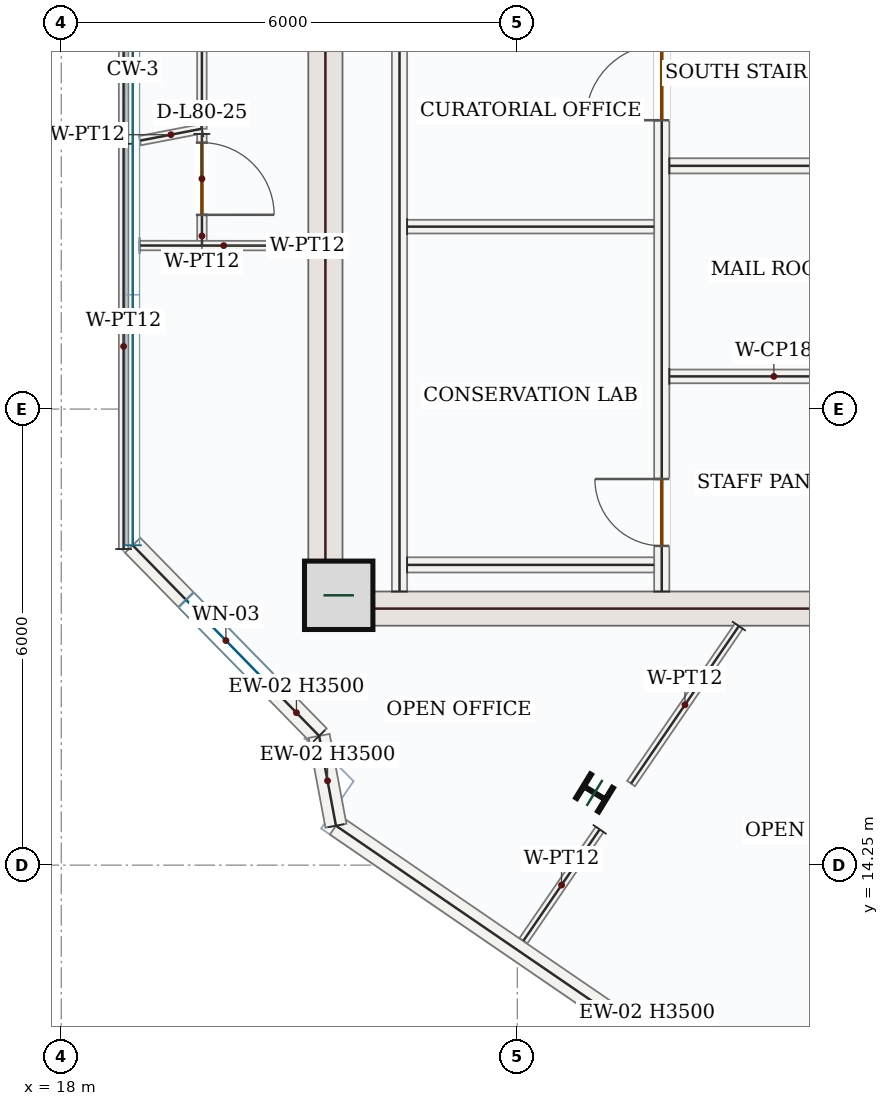
"""IFC4 building model, lengths in metres.
Left out: names, types, materials, properties, quantities, classifications, styles, units other than length and angle.
Written with IfcOpenShell. Run it as: python <this file> out.ifc"""

import sys

from ifc_helpers import new_model, si_unit, direction, frame, frame_2d, origin, origin_2d, place, context, subcontext, project, spatial, rectangle, i_section, extrude, source, transform, mapped, element, fill, save


model = new_model("IFC4")
c1 = context("Model", 3, precision=1e-05, world=origin(), true_north=direction((0.0, 1.0)))
c2 = subcontext(c1, "Body", "Model", "MODEL_VIEW")
j1 = project(units=[si_unit("LENGTHUNIT", "METRE"), si_unit("PLANEANGLEUNIT", "RADIAN")], contexts=[c1])
p1 = place(None, origin())
s1 = spatial("IfcSite", under=j1, at=p1, CompositionType="ELEMENT")
p2 = place(p1, origin())
s2 = spatial("IfcBuilding", under=s1, at=p2, CompositionType="ELEMENT")
p3 = place(p2, frame((0.0, 0.0, 331.05)))
s3 = spatial("IfcBuildingStorey", under=s2, at=p3, CompositionType="ELEMENT", Elevation=331.05)
m1 = source(origin(), c2, "Body", "SweptSolid", [
    extrude(rectangle(XDim=8.55, YDim=0.45, at=frame_2d((4.275, 0.0))), origin(), (0.0, 0.0, 1.0), 3.5),
])
p4 = place(p3, frame((21.475, 17.4, 0.0), z_axis=(0.0, 0.0, 1.0), x_axis=(0.0, 1.0, 0.0)))
e1 = element("IfcWall", 1, at=p4, inside=s3, PredefinedType="SHEAR", context=c2, shape_type="MappedRepresentation", body=[
    mapped(m1, transform((0.0, 0.0, 0.0), x_axis=(1.0, 0.0, 0.0), y_axis=(0.0, 1.0, 0.0), z_axis=(0.0, 0.0, 1.0), scale=1.0)),
])
m2 = source(origin(), c2, "Body", "SweptSolid", [
    extrude(rectangle(XDim=7.1, YDim=0.45, at=frame_2d((3.55, 0.0))), origin(), (0.0, 0.0, 1.0), 3.5),
])
p5 = place(p3, frame((21.7, 17.625, 0.0), z_axis=(0.0, 0.0, 1.0), x_axis=(1.0, 0.0, 0.0)))
e2 = element("IfcWall", 2, at=p5, inside=s3, PredefinedType="SHEAR", context=c2, shape_type="MappedRepresentation", body=[
    mapped(m2, transform((0.0, 0.0, 0.0), x_axis=(1.0, 0.0, 0.0), y_axis=(0.0, 1.0, 0.0), z_axis=(0.0, 0.0, 1.0), scale=1.0)),
])
m3 = source(origin(), c2, "Body", "SweptSolid", [
    extrude(rectangle(XDim=0.9, YDim=0.9, at=origin_2d()), origin(), (0.0, 0.0, 1.0), 3.75),
])
p6 = place(p3, frame((21.65, 17.8, 0.0), z_axis=(0.0, 0.0, 1.0), x_axis=(1.0, 0.0, 0.0)))
e3 = element("IfcColumn", 3, at=p6, inside=s3, PredefinedType="COLUMN", context=c2, shape_type="MappedRepresentation", body=[
    mapped(m3, transform((0.0, 0.0, 0.0), x_axis=(1.0, 0.0, 0.0), y_axis=(0.0, 1.0, 0.0), z_axis=(0.0, 0.0, 1.0), scale=1.0)),
])
m4 = source(origin(), c2, "Body", "SweptSolid", [
    extrude(i_section(OverallWidth=0.369, OverallDepth=0.356, WebThickness=0.011, FlangeThickness=0.018, FilletRadius=0.018, at=origin_2d()), origin(), (0.0, 0.0, 1.0), 3.75),
])
p7 = place(p3, frame((25.016, 15.2, 0.0), z_axis=(0.0, 0.0, 1.0), x_axis=(0.522498564716, 0.852640164354, 0.0)))
e4 = element("IfcColumn", 4, at=p7, inside=s3, PredefinedType="COLUMN", context=c2, shape_type="MappedRepresentation", body=[
    mapped(m4, transform((0.0, 0.0, 0.0), x_axis=(1.0, 0.0, 0.0), y_axis=(0.0, 1.0, 0.0), z_axis=(0.0, 0.0, 1.0), scale=1.0)),
])
p8 = place(p3, frame((21.393, 15.95, 0.0), z_axis=(0.0, 0.0, 1.0), x_axis=(-0.699198279454, 0.714927804753, 0.0)))
e5 = element("IfcWall", 5, at=p8, inside=s3, PredefinedType="SOLIDWALL", context=c2, shape_type="SweptSolid", body=[
    extrude(rectangle(XDim=3.508, YDim=0.28, at=frame_2d((1.754, 0.0))), origin(), (0.0, 0.0, 1.0), 3.5),
])
p9 = place(p8, frame((1.004, 0.0, 0.85)))
e6 = element("IfcOpeningElement", 6, at=p9, cuts=e5, PredefinedType="OPENING", context=c2, shape_type="SweptSolid", body=[
    extrude(rectangle(XDim=1.5, YDim=1.5, at=frame_2d((0.75, 0.75))), frame((0.0, 0.15, 0.0), z_axis=(0.0, -1.0, 0.0), x_axis=(1.0, 0.0, 0.0)), (0.0, 0.0, 1.0), 0.3),
])
m5 = source(origin(), c2, "Body", "SweptSolid", [
    extrude(rectangle(XDim=9.92, YDim=0.28, at=frame_2d((4.96, 0.0))), origin(), (0.0, 0.0, 1.0), 3.5),
])
p10 = place(p3, frame((29.799, 9.164, 0.0), z_axis=(0.0, 0.0, 1.0), x_axis=(-0.825121888295, 0.56495474992, 0.0)))
e7 = element("IfcWall", 7, at=p10, inside=s3, PredefinedType="SOLIDWALL", context=c2, shape_type="MappedRepresentation", body=[
    mapped(m5, transform((0.0, 0.0, 0.0), x_axis=(1.0, 0.0, 0.0), y_axis=(0.0, 1.0, 0.0), z_axis=(0.0, 0.0, 1.0), scale=1.0)),
])
m6 = source(origin(), c2, "Body", "SweptSolid", [
    extrude(rectangle(XDim=1.202, YDim=0.28, at=frame_2d((0.601, 0.0))), origin(), (0.0, 0.0, 1.0), 3.5),
])
p11 = place(p3, frame((21.614, 14.769, 0.0), z_axis=(0.0, 0.0, 1.0), x_axis=(-0.183994246351, 0.982927320462, 0.0)))
e8 = element("IfcWall", 8, at=p11, inside=s3, PredefinedType="SOLIDWALL", context=c2, shape_type="MappedRepresentation", body=[
    mapped(m6, transform((0.0, 0.0, 0.0), x_axis=(1.0, 0.0, 0.0), y_axis=(0.0, 1.0, 0.0), z_axis=(0.0, 0.0, 1.0), scale=1.0)),
])
m7 = source(origin(), c2, "Body", "SweptSolid", [
    extrude(rectangle(XDim=7.87, YDim=0.2, at=frame_2d((3.935, 0.0))), origin(), (0.0, 0.0, 1.0), 3.5),
])
p12 = place(p3, frame((22.45, 17.85, 0.0), z_axis=(0.0, 0.0, 1.0), x_axis=(0.0, 1.0, 0.0)))
e9 = element("IfcWall", 9, at=p12, inside=s3, PredefinedType="SOLIDWALL", context=c2, shape_type="MappedRepresentation", body=[
    mapped(m7, transform((0.0, 0.0, 0.0), x_axis=(1.0, 0.0, 0.0), y_axis=(0.0, 1.0, 0.0), z_axis=(0.0, 0.0, 1.0), scale=1.0)),
])
p13 = place(p3, frame((25.9, 17.85, 0.0), z_axis=(0.0, 0.0, 1.0), x_axis=(0.0, 1.0, 0.0)))
e10 = element("IfcWall", 10, at=p13, inside=s3, PredefinedType="SOLIDWALL", context=c2, shape_type="SweptSolid", body=[
    extrude(rectangle(XDim=8.0, YDim=0.2, at=frame_2d((4.0, 0.0))), origin(), (0.0, 0.0, 1.0), 3.5),
])
p14 = place(p13, frame((6.2, 0.0, 0.0)))
e11 = element("IfcOpeningElement", 11, at=p14, cuts=e10, PredefinedType="OPENING", context=c2, shape_type="SweptSolid", body=[
    extrude(rectangle(XDim=1.0, YDim=2.15, at=frame_2d((0.5, 1.075))), frame((0.0, 0.11, 0.0), z_axis=(0.0, -1.0, 0.0), x_axis=(1.0, 0.0, 0.0)), (0.0, 0.0, 1.0), 0.22),
])
p15 = place(p13, frame((0.6, 0.0, 0.0)))
e12 = element("IfcOpeningElement", 12, at=p15, cuts=e10, PredefinedType="OPENING", context=c2, shape_type="SweptSolid", body=[
    extrude(rectangle(XDim=0.88, YDim=2.1, at=frame_2d((0.44, 1.05))), frame((0.0, 0.11, 0.0), z_axis=(0.0, -1.0, 0.0), x_axis=(1.0, 0.0, 0.0)), (0.0, 0.0, 1.0), 0.22),
])
m8 = source(origin(), c2, "Body", "SweptSolid", [
    extrude(rectangle(XDim=3.25, YDim=0.2, at=frame_2d((1.625, 0.0))), origin(), (0.0, 0.0, 1.0), 3.5),
])
p16 = place(p3, frame((22.55, 18.2, 0.0), z_axis=(0.0, 0.0, 1.0), x_axis=(1.0, 0.0, 0.0)))
e13 = element("IfcWall", 13, at=p16, inside=s3, PredefinedType="SOLIDWALL", context=c2, shape_type="MappedRepresentation", body=[
    mapped(m8, transform((0.0, 0.0, 0.0), x_axis=(1.0, 0.0, 0.0), y_axis=(0.0, 1.0, 0.0), z_axis=(0.0, 0.0, 1.0), scale=1.0)),
])
m9 = source(origin(), c2, "Body", "SweptSolid", [
    extrude(rectangle(XDim=3.25, YDim=0.18, at=frame_2d((1.625, 0.0))), origin(), (0.0, 0.0, 1.0), 3.5),
])
p17 = place(p3, frame((22.55, 22.65, 0.0), z_axis=(0.0, 0.0, 1.0), x_axis=(1.0, 0.0, 0.0)))
e14 = element("IfcWall", 14, at=p17, inside=s3, PredefinedType="PARTITIONING", context=c2, shape_type="MappedRepresentation", body=[
    mapped(m9, transform((0.0, 0.0, 0.0), x_axis=(1.0, 0.0, 0.0), y_axis=(0.0, 1.0, 0.0), z_axis=(0.0, 0.0, 1.0), scale=1.0)),
])
m10 = source(origin(), c2, "Body", "SweptSolid", [
    extrude(rectangle(XDim=2.75, YDim=0.2, at=frame_2d((1.375, 0.0))), origin(), (0.0, 0.0, 1.0), 3.5),
])
p18 = place(p3, frame((26.0, 23.45, 0.0), z_axis=(0.0, 0.0, 1.0), x_axis=(1.0, 0.0, 0.0)))
e15 = element("IfcWall", 15, at=p18, inside=s3, PredefinedType="SOLIDWALL", context=c2, shape_type="MappedRepresentation", body=[
    mapped(m10, transform((0.0, 0.0, 0.0), x_axis=(1.0, 0.0, 0.0), y_axis=(0.0, 1.0, 0.0), z_axis=(0.0, 0.0, 1.0), scale=1.0)),
])
m11 = source(origin(), c2, "Body", "SweptSolid", [
    extrude(rectangle(XDim=2.75, YDim=0.18, at=frame_2d((1.375, 0.0))), origin(), (0.0, 0.0, 1.0), 3.5),
])
p19 = place(p3, frame((26.0, 20.68, 0.0), z_axis=(0.0, 0.0, 1.0), x_axis=(1.0, 0.0, 0.0)))
e16 = element("IfcWall", 16, at=p19, inside=s3, PredefinedType="PARTITIONING", context=c2, shape_type="MappedRepresentation", body=[
    mapped(m11, transform((0.0, 0.0, 0.0), x_axis=(1.0, 0.0, 0.0), y_axis=(0.0, 1.0, 0.0), z_axis=(0.0, 0.0, 1.0), scale=1.0)),
])
p20 = place(p3, frame((19.853, 31.53, 0.0), z_axis=(0.0, 0.0, 1.0), x_axis=(-0.000321574412, -0.999999948295, 0.0)))
e17 = element("IfcWall", 17, at=p20, inside=s3, PredefinedType="PARTITIONING", context=c2, shape_type="SweptSolid", body=[
    extrude(rectangle(XDim=7.592, YDim=0.125, at=frame_2d((3.796, 0.0))), origin(), (0.0, 0.0, 1.0), 3.5),
])
p21 = place(p20, frame((5.181, 0.0, 0.0)))
e18 = element("IfcOpeningElement", 18, at=p21, cuts=e17, PredefinedType="OPENING", context=c2, shape_type="SweptSolid", body=[
    extrude(rectangle(XDim=0.95, YDim=2.15, at=frame_2d((0.475, 1.075))), frame((0.0, 0.073, 0.0), z_axis=(0.0, -1.0, 0.0), x_axis=(1.0, 0.0, 0.0)), (0.0, 0.0, 1.0), 0.145),
])
m12 = source(origin(), c2, "Body", "SweptSolid", [
    extrude(rectangle(XDim=0.83, YDim=0.125, at=frame_2d((0.415, 0.0))), origin(), (0.0, 0.0, 1.0), 3.5),
])
p22 = place(p3, frame((19.85, 23.938, 0.0), z_axis=(0.0, 0.0, 1.0), x_axis=(-0.98205677528, -0.188585498189, 0.0)))
e19 = element("IfcWall", 19, at=p22, inside=s3, PredefinedType="PARTITIONING", context=c2, shape_type="MappedRepresentation", body=[
    mapped(m12, transform((0.0, 0.0, 0.0), x_axis=(1.0, 0.0, 0.0), y_axis=(0.0, 1.0, 0.0), z_axis=(0.0, 0.0, 1.0), scale=1.0)),
])
m13 = source(origin(), c2, "Body", "SweptSolid", [
    extrude(rectangle(XDim=6.795, YDim=0.125, at=frame_2d((3.397, 0.0))), origin(), (0.0, 0.0, 1.0), 3.5),
])
p23 = place(p3, frame((18.82, 23.74, 0.0), z_axis=(0.0, 0.0, 1.0), x_axis=(-7.1862312e-05, 0.999999997418, 0.0)))
e20 = element("IfcWall", 20, at=p23, inside=s3, PredefinedType="PARTITIONING", context=c2, shape_type="MappedRepresentation", body=[
    mapped(m13, transform((0.0, 0.0, 0.0), x_axis=(1.0, 0.0, 0.0), y_axis=(0.0, 1.0, 0.0), z_axis=(0.0, 0.0, 1.0), scale=1.0)),
])
p24 = place(p3, frame((19.85, 23.869, 0.0), z_axis=(0.0, 0.0, 1.0), x_axis=(0.000665004009, -0.999999778885, 0.0)))
e21 = element("IfcWall", 21, at=p24, inside=s3, PredefinedType="PARTITIONING", context=c2, shape_type="SweptSolid", body=[
    extrude(rectangle(XDim=1.469, YDim=0.125, at=frame_2d((0.734, 0.0))), origin(), (0.0, 0.0, 1.0), 3.5),
])
p25 = place(p24, frame((0.114, 0.0, 0.0)))
e22 = element("IfcOpeningElement", 22, at=p25, cuts=e21, PredefinedType="OPENING", context=c2, shape_type="SweptSolid", body=[
    extrude(rectangle(XDim=0.95, YDim=2.15, at=frame_2d((0.475, 1.075))), frame((0.0, 0.073, 0.0), z_axis=(0.0, -1.0, 0.0), x_axis=(1.0, 0.0, 0.0)), (0.0, 0.0, 1.0), 0.145),
])
m14 = source(origin(), c2, "Body", "SweptSolid", [
    extrude(rectangle(XDim=2.215, YDim=0.125, at=frame_2d((1.107, 0.0))), origin(), (0.0, 0.0, 1.0), 3.5),
])
p26 = place(p3, frame((19.03, 22.402, 0.0), z_axis=(0.0, 0.0, 1.0), x_axis=(0.999999702379, -0.000771519665, 0.0)))
e23 = element("IfcWall", 23, at=p26, inside=s3, PredefinedType="PARTITIONING", context=c2, shape_type="MappedRepresentation", body=[
    mapped(m14, transform((0.0, 0.0, 0.0), x_axis=(1.0, 0.0, 0.0), y_axis=(0.0, 1.0, 0.0), z_axis=(0.0, 0.0, 1.0), scale=1.0)),
])
m15 = source(origin(), c2, "Body", "SweptSolid", [
    extrude(rectangle(XDim=2.511, YDim=0.125, at=frame_2d((1.255, 0.0))), origin(), (0.0, 0.0, 1.0), 3.5),
])
p27 = place(p3, frame((26.915, 17.395, 0.0), z_axis=(0.0, 0.0, 1.0), x_axis=(-0.564980194272, -0.825104466162, 0.0)))
e24 = element("IfcWall", 24, at=p27, inside=s3, PredefinedType="PARTITIONING", context=c2, shape_type="MappedRepresentation", body=[
    mapped(m15, transform((0.0, 0.0, 0.0), x_axis=(1.0, 0.0, 0.0), y_axis=(0.0, 1.0, 0.0), z_axis=(0.0, 0.0, 1.0), scale=1.0)),
])
m16 = source(origin(), c2, "Body", "SweptSolid", [
    extrude(rectangle(XDim=1.775, YDim=0.125, at=frame_2d((0.888, 0.0))), origin(), (0.0, 0.0, 1.0), 3.5),
])
p28 = place(p3, frame((25.083, 14.72, 0.0), z_axis=(0.0, 0.0, 1.0), x_axis=(-0.56509798207, -0.825023800057, 0.0)))
e25 = element("IfcWall", 25, at=p28, inside=s3, PredefinedType="PARTITIONING", context=c2, shape_type="MappedRepresentation", body=[
    mapped(m16, transform((0.0, 0.0, 0.0), x_axis=(1.0, 0.0, 0.0), y_axis=(0.0, 1.0, 0.0), z_axis=(0.0, 0.0, 1.0), scale=1.0)),
])
m17 = source(origin(), c2, "Body", "SweptSolid", [
    extrude(rectangle(XDim=5.332, YDim=0.125, at=frame_2d((2.666, 0.0))), origin(), (0.0, 0.0, 1.0), 3.5),
])
p29 = place(p3, frame((18.82, 18.408, 0.0), z_axis=(0.0, 0.0, 1.0), x_axis=(0.0, 1.0, 0.0)))
e26 = element("IfcWall", 26, at=p29, inside=s3, PredefinedType="PARTITIONING", context=c2, shape_type="MappedRepresentation", body=[
    mapped(m17, transform((0.0, 0.0, 0.0), x_axis=(1.0, 0.0, 0.0), y_axis=(0.0, 1.0, 0.0), z_axis=(0.0, 0.0, 1.0), scale=1.0)),
])
m18 = source(origin(), c2, "Body", "SweptSolid", [
    extrude(rectangle(XDim=1.5, YDim=1.5, at=frame_2d((0.75, 0.75))), frame((0.0, 0.03, 0.0), z_axis=(0.0, -1.0, 0.0), x_axis=(1.0, 0.0, 0.0)), (0.0, 0.0, 1.0), 0.06),
])
p30 = place(p9, origin())
e27 = element("IfcWindow", 27, at=p30, inside=s3, PartitioningType="SINGLE_PANEL", PredefinedType="WINDOW", context=c2, shape_type="MappedRepresentation", body=[
    mapped(m18, transform((0.0, 0.0, 0.0), x_axis=(1.0, 0.0, 0.0), y_axis=(0.0, 1.0, 0.0), z_axis=(0.0, 0.0, 1.0), scale=1.0)),
])
fill(e6, e27)
m19 = source(origin(), c2, "Body", "SweptSolid", [
    extrude(rectangle(XDim=1.0, YDim=2.15, at=frame_2d((0.5, 1.075))), frame((0.0, 0.025, 0.0), z_axis=(0.0, -1.0, 0.0), x_axis=(1.0, 0.0, 0.0)), (0.0, 0.0, 1.0), 0.05),
])
p31 = place(p14, origin())
e28 = element("IfcDoor", 28, at=p31, inside=s3, OperationType="SINGLE_SWING_LEFT", PredefinedType="DOOR", context=c2, shape_type="MappedRepresentation", body=[
    mapped(m19, transform((0.0, 0.0, 0.0), x_axis=(1.0, 0.0, 0.0), y_axis=(0.0, 1.0, 0.0), z_axis=(0.0, 0.0, 1.0), scale=1.0)),
])
fill(e11, e28)
m20 = source(origin(), c2, "Body", "SweptSolid", [
    extrude(rectangle(XDim=0.88, YDim=2.1, at=frame_2d((0.44, 1.05))), frame((0.0, 0.025, 0.0), z_axis=(0.0, -1.0, 0.0), x_axis=(1.0, 0.0, 0.0)), (0.0, 0.0, 1.0), 0.05),
])
p32 = place(p15, origin())
e29 = element("IfcDoor", 29, at=p32, inside=s3, OperationType="SINGLE_SWING_RIGHT", PredefinedType="DOOR", context=c2, shape_type="MappedRepresentation", body=[
    mapped(m20, transform((0.0, 0.0, 0.0), x_axis=(1.0, 0.0, 0.0), y_axis=(0.0, 1.0, 0.0), z_axis=(0.0, 0.0, 1.0), scale=1.0)),
])
fill(e12, e29)
m21 = source(origin(), c2, "Body", "SweptSolid", [
    extrude(rectangle(XDim=0.95, YDim=2.15, at=frame_2d((0.475, 1.075))), frame((0.0, 0.025, 0.0), z_axis=(0.0, -1.0, 0.0), x_axis=(1.0, 0.0, 0.0)), (0.0, 0.0, 1.0), 0.05),
])
p33 = place(p25, origin())
e30 = element("IfcDoor", 30, at=p33, inside=s3, OperationType="SINGLE_SWING_RIGHT", PredefinedType="DOOR", context=c2, shape_type="MappedRepresentation", body=[
    mapped(m21, transform((0.0, 0.0, 0.0), x_axis=(1.0, 0.0, 0.0), y_axis=(0.0, 1.0, 0.0), z_axis=(0.0, 0.0, 1.0), scale=1.0)),
])
fill(e22, e30)
save(model, sys.argv[1])
